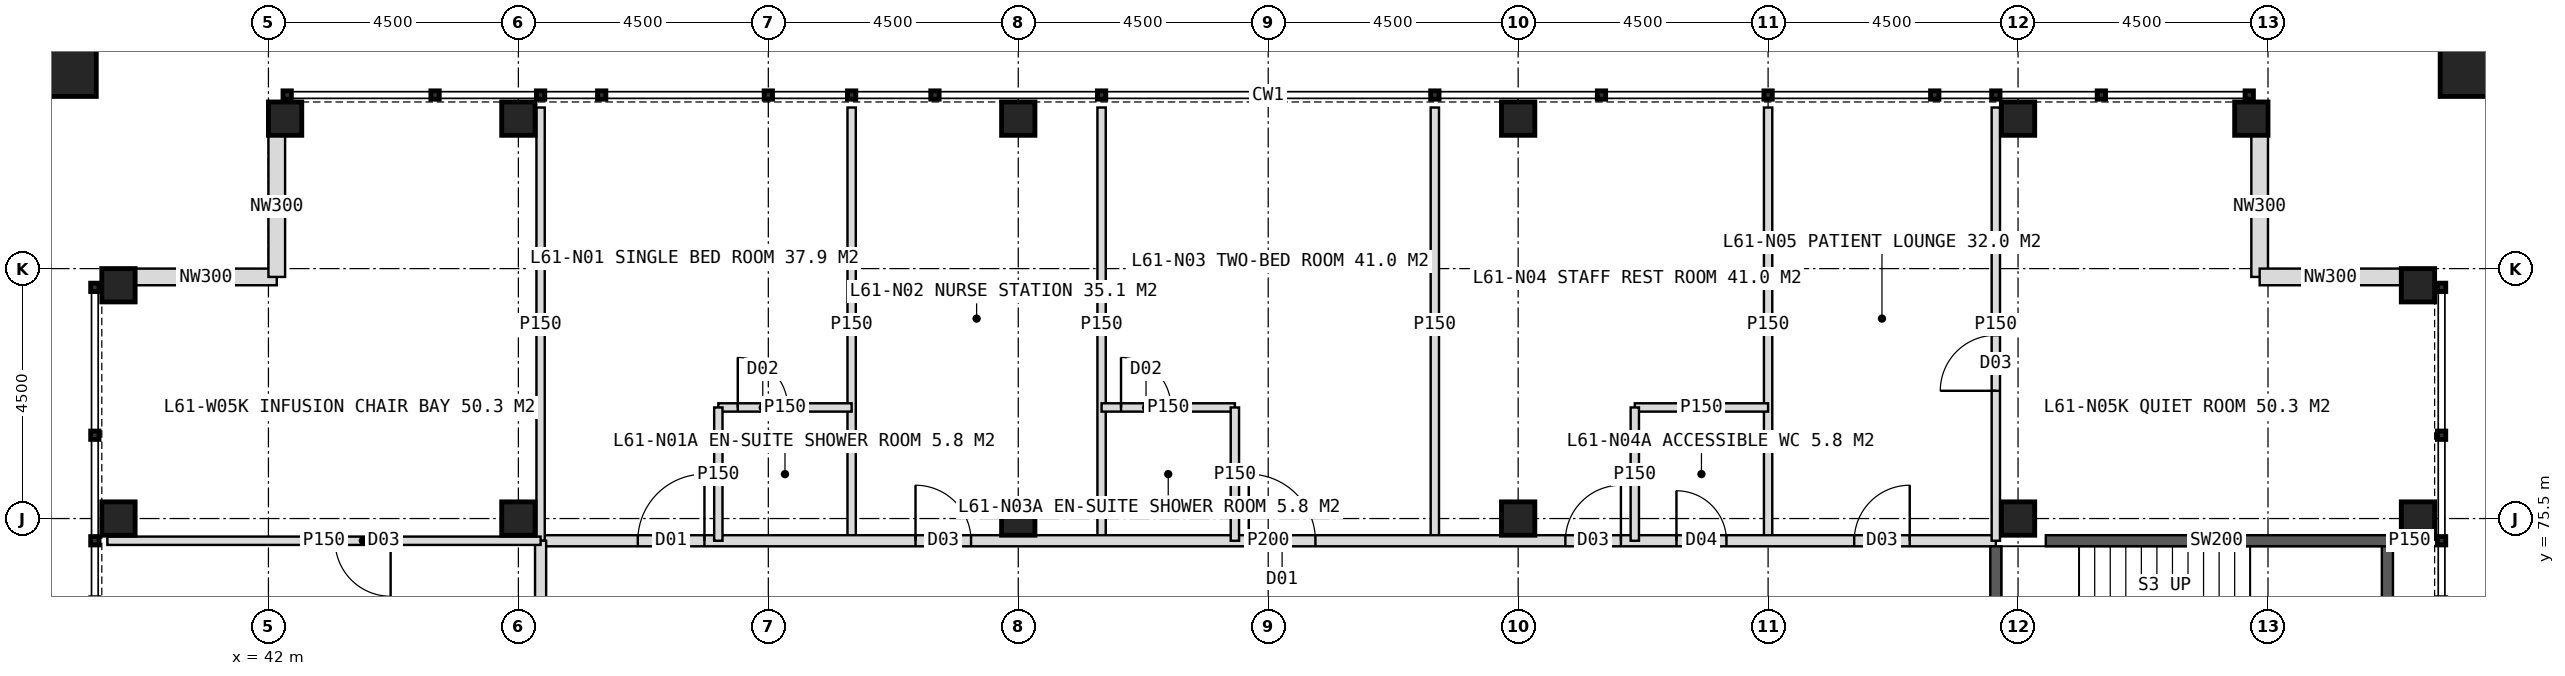
"""IFC4 building model, lengths in metres.
Left out: names, types, materials, properties, quantities, classifications, styles, units other than length and angle.
Written with IfcOpenShell. Run it as: python <this file> out.ifc"""

import sys

from ifc_helpers import new_model, si_unit, direction, frame, frame_2d, origin, origin_2d, place, context, subcontext, project, spatial, rectangle, hollow_rectangle, extrude, element, fill, save


model = new_model("IFC4")
c1 = context("Model", 3, precision=1e-05, world=origin(), true_north=direction((0.0, 1.0)))
c2 = subcontext(c1, "Body", "Model", "MODEL_VIEW")
j1 = project(units=[si_unit("LENGTHUNIT", "METRE"), si_unit("PLANEANGLEUNIT", "RADIAN")], contexts=[c1])
p1 = place(None, origin())
s1 = spatial("IfcSite", under=j1, at=p1, CompositionType="ELEMENT")
p2 = place(p1, origin())
s2 = spatial("IfcBuilding", under=s1, at=p2, CompositionType="ELEMENT")
p3 = place(p2, frame((0.0, 0.0, 254.0)))
s3 = spatial("IfcBuildingStorey", under=s2, at=p3, CompositionType="ELEMENT", Elevation=254.0)
for number, where, z_axis, x_axis in (
    (1, (73.5, 75.5, 0.0), (0.0, 0.0, 1.0), (1.0, 0.0, 0.0)),
    (2, (46.5, 75.5, 0.0), (0.0, 0.0, 1.0), (1.0, 0.0, 0.0)),
    (3, (55.5, 75.5, 0.0), (0.0, 0.0, 1.0), (1.0, 0.0, 0.0)),
    (4, (64.5, 75.5, 0.0), (0.0, 0.0, 1.0), (1.0, 0.0, 0.0)),
    (5, (42.3, 82.7, 0.0), (0.0, 0.0, 1.0), (1.0, 0.0, 0.0)),
    (6, (46.5, 82.7, 0.0), (0.0, 0.0, 1.0), (1.0, 0.0, 0.0)),
    (7, (55.5, 82.7, 0.0), (0.0, 0.0, 1.0), (1.0, 0.0, 0.0)),
    (8, (64.5, 82.7, 0.0), (0.0, 0.0, 1.0), (1.0, 0.0, 0.0)),
    (9, (73.5, 82.7, 0.0), (0.0, 0.0, 1.0), (1.0, 0.0, 0.0)),
    (10, (39.3, 75.5, 0.0), (0.0, 0.0, 1.0), (1.0, 0.0, 0.0)),
    (11, (80.7, 75.5, 0.0), (0.0, 0.0, 1.0), (1.0, 0.0, 0.0)),
    (12, (77.7, 82.7, 0.0), (0.0, 0.0, 1.0), (1.0, 0.0, 0.0)),
    (13, (39.3, 79.7, 0.0), (0.0, 0.0, 1.0), (1.0, 0.0, 0.0)),
    (14, (80.7, 79.7, 0.0), (0.0, 0.0, 1.0), (1.0, 0.0, 0.0)),
):
    element("IfcColumn", number, at=place(p3, frame(where, z_axis=z_axis, x_axis=x_axis)), inside=s3, PredefinedType="COLUMN", context=c2, shape_type="SweptSolid", body=[
        extrude(hollow_rectangle(XDim=0.6, YDim=0.6, WallThickness=0.04, at=origin_2d()), origin(), (0.0, 0.0, 1.0), 4.0),
    ])
for number, where, z_axis, x_axis in (
    (15, (81.6, 83.6, 0.0), (0.0, 0.0, 1.0), (1.0, 0.0, 0.0)),
    (16, (38.4, 83.6, 0.0), (0.0, 0.0, 1.0), (1.0, 0.0, 0.0)),
):
    element("IfcColumn", number, at=place(p3, frame(where, z_axis=z_axis, x_axis=x_axis)), inside=s3, PredefinedType="COLUMN", context=c2, shape_type="SweptSolid", body=[
        extrude(hollow_rectangle(XDim=1.0, YDim=1.0, WallThickness=0.06, at=origin_2d()), origin(), (0.0, 0.0, 1.0), 4.0),
    ])
for number, where, z_axis, x_axis in (
    (17, (77.85, 82.4, 0.0), (0.0, 0.0, 1.0), (0.0, -1.0, 0.0)),
    (18, (77.85, 79.85, 0.0), (0.0, 0.0, 1.0), (1.0, 0.0, 0.0)),
    (19, (39.6, 79.85, 0.0), (0.0, 0.0, 1.0), (1.0, 0.0, 0.0)),
    (20, (42.15, 79.85, 0.0), (0.0, 0.0, 1.0), (0.0, 1.0, 0.0)),
):
    element("IfcWall", number, at=place(p3, frame(where, z_axis=z_axis, x_axis=x_axis)), inside=s3, PredefinedType="ELEMENTEDWALL", context=c2, shape_type="SweptSolid", body=[
        extrude(rectangle(XDim=2.55, YDim=0.3, at=frame_2d((1.275, 0.0))), origin(), (0.0, 0.0, 1.0), 2.95),
    ])
for number, where, z_axis, x_axis in (
    (21, (52.5, 75.1, 0.0), (0.0, 0.0, 1.0), (0.0, 1.0, 0.0)),
    (22, (57.0, 75.1, 0.0), (0.0, 0.0, 1.0), (0.0, 1.0, 0.0)),
    (23, (63.0, 75.1, 0.0), (0.0, 0.0, 1.0), (0.0, 1.0, 0.0)),
    (24, (69.0, 75.1, 0.0), (0.0, 0.0, 1.0), (0.0, 1.0, 0.0)),
):
    element("IfcWall", number, at=place(p3, frame(where, z_axis=z_axis, x_axis=x_axis)), inside=s3, PredefinedType="PARTITIONING", context=c2, shape_type="SweptSolid", body=[
        extrude(rectangle(XDim=7.8, YDim=0.15, at=frame_2d((3.9, 0.0))), origin(), (0.0, 0.0, 1.0), 3.75),
    ])
p4 = place(p3, frame((46.9, 75.1, 0.0), z_axis=(0.0, 0.0, 1.0), x_axis=(1.0, 0.0, 0.0)))
e25 = element("IfcWall", 25, at=p4, inside=s3, PredefinedType="PARTITIONING", context=c2, shape_type="SweptSolid", body=[
    extrude(rectangle(XDim=26.2, YDim=0.2, at=frame_2d((13.1, 0.0))), origin(), (0.0, 0.0, 1.0), 3.75),
])
p5 = place(p4, frame((1.75, 0.0, 0.0)))
e26 = element("IfcOpeningElement", 26, at=p5, cuts=e25, PredefinedType="OPENING", context=c2, shape_type="SweptSolid", body=[
    extrude(rectangle(XDim=1.2, YDim=2.2, at=frame_2d((0.6, 1.1))), frame((0.0, 0.11, 0.0), z_axis=(0.0, -1.0, 0.0), x_axis=(1.0, 0.0, 0.0)), (0.0, 0.0, 1.0), 0.22),
])
p6 = place(p4, frame((6.75, 0.0, 0.0)))
e27 = element("IfcOpeningElement", 27, at=p6, cuts=e25, PredefinedType="OPENING", context=c2, shape_type="SweptSolid", body=[
    extrude(rectangle(XDim=1.0, YDim=2.1, at=frame_2d((0.5, 1.05))), frame((0.0, 0.11, 0.0), z_axis=(0.0, -1.0, 0.0), x_axis=(1.0, 0.0, 0.0)), (0.0, 0.0, 1.0), 0.22),
])
p7 = place(p4, frame((12.75, 0.0, 0.0)))
e28 = element("IfcOpeningElement", 28, at=p7, cuts=e25, PredefinedType="OPENING", context=c2, shape_type="SweptSolid", body=[
    extrude(rectangle(XDim=1.2, YDim=2.2, at=frame_2d((0.6, 1.1))), frame((0.0, 0.11, 0.0), z_axis=(0.0, -1.0, 0.0), x_axis=(1.0, 0.0, 0.0)), (0.0, 0.0, 1.0), 0.22),
])
p8 = place(p4, frame((20.45, 0.0, 0.0)))
e29 = element("IfcOpeningElement", 29, at=p8, cuts=e25, PredefinedType="OPENING", context=c2, shape_type="SweptSolid", body=[
    extrude(rectangle(XDim=0.9, YDim=2.1, at=frame_2d((0.45, 1.05))), frame((0.0, 0.11, 0.0), z_axis=(0.0, -1.0, 0.0), x_axis=(1.0, 0.0, 0.0)), (0.0, 0.0, 1.0), 0.22),
])
p9 = place(p4, frame((18.45, 0.0, 0.0)))
e30 = element("IfcOpeningElement", 30, at=p9, cuts=e25, PredefinedType="OPENING", context=c2, shape_type="SweptSolid", body=[
    extrude(rectangle(XDim=1.0, YDim=2.1, at=frame_2d((0.5, 1.05))), frame((0.0, 0.11, 0.0), z_axis=(0.0, -1.0, 0.0), x_axis=(1.0, 0.0, 0.0)), (0.0, 0.0, 1.0), 0.22),
])
p10 = place(p4, frame((23.65, 0.0, 0.0)))
e31 = element("IfcOpeningElement", 31, at=p10, cuts=e25, PredefinedType="OPENING", context=c2, shape_type="SweptSolid", body=[
    extrude(rectangle(XDim=1.0, YDim=2.1, at=frame_2d((0.5, 1.05))), frame((0.0, 0.11, 0.0), z_axis=(0.0, -1.0, 0.0), x_axis=(1.0, 0.0, 0.0)), (0.0, 0.0, 1.0), 0.22),
])
p11 = place(p3, frame((46.9, 75.1, 0.0), z_axis=(0.0, 0.0, 1.0), x_axis=(0.0, 1.0, 0.0)))
e32 = element("IfcWall", 32, at=p11, inside=s3, PredefinedType="PARTITIONING", context=c2, shape_type="SweptSolid", body=[
    extrude(rectangle(XDim=7.8, YDim=0.15, at=frame_2d((3.9, 0.0))), origin(), (0.0, 0.0, 1.0), 3.75),
])
p12 = place(p3, frame((50.1, 77.5, 0.0), z_axis=(0.0, 0.0, 1.0), x_axis=(1.0, 0.0, 0.0)))
e33 = element("IfcWall", 33, at=p12, inside=s3, PredefinedType="PARTITIONING", context=c2, shape_type="SweptSolid", body=[
    extrude(rectangle(XDim=2.4, YDim=0.15, at=frame_2d((1.2, 0.0))), origin(), (0.0, 0.0, 1.0), 3.75),
])
p13 = place(p12, frame((0.35, 0.0, 0.0)))
e34 = element("IfcOpeningElement", 34, at=p13, cuts=e33, PredefinedType="OPENING", context=c2, shape_type="SweptSolid", body=[
    extrude(rectangle(XDim=0.9, YDim=2.1, at=frame_2d((0.45, 1.05))), frame((0.0, 0.085, 0.0), z_axis=(0.0, -1.0, 0.0), x_axis=(1.0, 0.0, 0.0)), (0.0, 0.0, 1.0), 0.17),
])
p14 = place(p3, frame((50.1, 75.1, 0.0), z_axis=(0.0, 0.0, 1.0), x_axis=(0.0, 1.0, 0.0)))
e35 = element("IfcWall", 35, at=p14, inside=s3, PredefinedType="PARTITIONING", context=c2, shape_type="SweptSolid", body=[
    extrude(rectangle(XDim=2.4, YDim=0.15, at=frame_2d((1.2, 0.0))), origin(), (0.0, 0.0, 1.0), 3.75),
])
p15 = place(p3, frame((57.0, 77.5, 0.0), z_axis=(0.0, 0.0, 1.0), x_axis=(1.0, 0.0, 0.0)))
e36 = element("IfcWall", 36, at=p15, inside=s3, PredefinedType="PARTITIONING", context=c2, shape_type="SweptSolid", body=[
    extrude(rectangle(XDim=2.4, YDim=0.15, at=frame_2d((1.2, 0.0))), origin(), (0.0, 0.0, 1.0), 3.75),
])
p16 = place(p15, frame((0.35, 0.0, 0.0)))
e37 = element("IfcOpeningElement", 37, at=p16, cuts=e36, PredefinedType="OPENING", context=c2, shape_type="SweptSolid", body=[
    extrude(rectangle(XDim=0.9, YDim=2.1, at=frame_2d((0.45, 1.05))), frame((0.0, 0.085, 0.0), z_axis=(0.0, -1.0, 0.0), x_axis=(1.0, 0.0, 0.0)), (0.0, 0.0, 1.0), 0.17),
])
for number, where, z_axis, x_axis in (
    (38, (59.4, 75.1, 0.0), (0.0, 0.0, 1.0), (0.0, 1.0, 0.0)),
    (39, (66.6, 77.5, 0.0), (0.0, 0.0, 1.0), (1.0, 0.0, 0.0)),
    (40, (66.6, 75.1, 0.0), (0.0, 0.0, 1.0), (0.0, 1.0, 0.0)),
):
    element("IfcWall", number, at=place(p3, frame(where, z_axis=z_axis, x_axis=x_axis)), inside=s3, PredefinedType="PARTITIONING", context=c2, shape_type="SweptSolid", body=[
        extrude(rectangle(XDim=2.4, YDim=0.15, at=frame_2d((1.2, 0.0))), origin(), (0.0, 0.0, 1.0), 3.75),
    ])
p17 = place(p3, frame((73.1, 75.1, 0.0), z_axis=(0.0, 0.0, 1.0), x_axis=(0.0, 1.0, 0.0)))
e41 = element("IfcWall", 41, at=p17, inside=s3, PredefinedType="PARTITIONING", context=c2, shape_type="SweptSolid", body=[
    extrude(rectangle(XDim=7.8, YDim=0.15, at=frame_2d((3.9, 0.0))), origin(), (0.0, 0.0, 1.0), 3.75),
])
p18 = place(p17, frame((2.7, 0.0, 0.0)))
e42 = element("IfcOpeningElement", 42, at=p18, cuts=e41, PredefinedType="OPENING", context=c2, shape_type="SweptSolid", body=[
    extrude(rectangle(XDim=1.0, YDim=2.1, at=frame_2d((0.5, 1.05))), frame((0.0, 0.085, 0.0), z_axis=(0.0, -1.0, 0.0), x_axis=(1.0, 0.0, 0.0)), (0.0, 0.0, 1.0), 0.17),
])
p19 = place(p3, frame((46.9, 48.9, 0.0), z_axis=(0.0, 0.0, 1.0), x_axis=(0.0, 1.0, 0.0)))
e43 = element("IfcWall", 43, at=p19, inside=s3, PredefinedType="PARTITIONING", context=c2, shape_type="SweptSolid", body=[
    extrude(rectangle(XDim=26.2, YDim=0.2, at=frame_2d((13.1, 0.0))), origin(), (0.0, 0.0, 1.0), 3.75),
])
p20 = place(p19, frame((1.75, 0.0, 0.0)))
e44 = element("IfcOpeningElement", 44, at=p20, cuts=e43, PredefinedType="OPENING", context=c2, shape_type="SweptSolid", body=[
    extrude(rectangle(XDim=1.2, YDim=2.2, at=frame_2d((0.6, 1.1))), frame((0.0, 0.11, 0.0), z_axis=(0.0, -1.0, 0.0), x_axis=(1.0, 0.0, 0.0)), (0.0, 0.0, 1.0), 0.22),
])
p21 = place(p19, frame((6.75, 0.0, 0.0)))
e45 = element("IfcOpeningElement", 45, at=p21, cuts=e43, PredefinedType="OPENING", context=c2, shape_type="SweptSolid", body=[
    extrude(rectangle(XDim=1.0, YDim=2.1, at=frame_2d((0.5, 1.05))), frame((0.0, 0.11, 0.0), z_axis=(0.0, -1.0, 0.0), x_axis=(1.0, 0.0, 0.0)), (0.0, 0.0, 1.0), 0.22),
])
p22 = place(p19, frame((11.1, 0.0, 0.0)))
e46 = element("IfcOpeningElement", 46, at=p22, cuts=e43, PredefinedType="OPENING", context=c2, shape_type="SweptSolid", body=[
    extrude(rectangle(XDim=1.0, YDim=2.1, at=frame_2d((0.5, 1.05))), frame((0.0, 0.11, 0.0), z_axis=(0.0, -1.0, 0.0), x_axis=(1.0, 0.0, 0.0)), (0.0, 0.0, 1.0), 0.22),
])
p23 = place(p19, frame((18.45, 0.0, 0.0)))
e47 = element("IfcOpeningElement", 47, at=p23, cuts=e43, PredefinedType="OPENING", context=c2, shape_type="SweptSolid", body=[
    extrude(rectangle(XDim=1.2, YDim=2.2, at=frame_2d((0.6, 1.1))), frame((0.0, 0.11, 0.0), z_axis=(0.0, -1.0, 0.0), x_axis=(1.0, 0.0, 0.0)), (0.0, 0.0, 1.0), 0.22),
])
p24 = place(p19, frame((23.25, 0.0, 0.0)))
e48 = element("IfcOpeningElement", 48, at=p24, cuts=e43, PredefinedType="OPENING", context=c2, shape_type="SweptSolid", body=[
    extrude(rectangle(XDim=1.2, YDim=2.2, at=frame_2d((0.6, 1.1))), frame((0.0, 0.11, 0.0), z_axis=(0.0, -1.0, 0.0), x_axis=(1.0, 0.0, 0.0)), (0.0, 0.0, 1.0), 0.22),
])
p25 = place(p3, frame((46.9, 75.1, 0.0), z_axis=(0.0, 0.0, 1.0), x_axis=(-1.0, 0.0, 0.0)))
e49 = element("IfcWall", 49, at=p25, inside=s3, PredefinedType="PARTITIONING", context=c2, shape_type="SweptSolid", body=[
    extrude(rectangle(XDim=7.8, YDim=0.15, at=frame_2d((3.9, 0.0))), origin(), (0.0, 0.0, 1.0), 3.75),
])
p26 = place(p25, frame((2.7, 0.0, 0.0)))
e50 = element("IfcOpeningElement", 50, at=p26, cuts=e49, PredefinedType="OPENING", context=c2, shape_type="SweptSolid", body=[
    extrude(rectangle(XDim=1.0, YDim=2.1, at=frame_2d((0.5, 1.05))), frame((0.0, 0.085, 0.0), z_axis=(0.0, -1.0, 0.0), x_axis=(1.0, 0.0, 0.0)), (0.0, 0.0, 1.0), 0.17),
])
p27 = place(p3, frame((80.2, 75.1, 0.0), z_axis=(0.0, 0.0, 1.0), x_axis=(1.0, 0.0, 0.0)))
e51 = element("IfcWall", 51, at=p27, inside=s3, PredefinedType="PARTITIONING", context=c2, shape_type="SweptSolid", body=[
    extrude(rectangle(XDim=0.7, YDim=0.15, at=frame_2d((0.35, 0.0))), origin(), (0.0, 0.0, 1.0), 3.75),
])
p28 = place(p3, frame((73.1, 75.0, 0.0), z_axis=(0.0, 0.0, 1.0), x_axis=(0.0, -1.0, 0.0)))
e52 = element("IfcWall", 52, at=p28, inside=s3, PredefinedType="SOLIDWALL", context=c2, shape_type="SweptSolid", body=[
    extrude(rectangle(XDim=4.0, YDim=0.2, at=frame_2d((2.0, 0.0))), origin(), (0.0, 0.0, 1.0), 3.75),
])
p29 = place(p28, frame((1.5, 0.0, 0.0)))
e53 = element("IfcOpeningElement", 53, at=p29, cuts=e52, PredefinedType="OPENING", context=c2, shape_type="SweptSolid", body=[
    extrude(rectangle(XDim=1.2, YDim=2.1, at=frame_2d((0.6, 1.05))), frame((0.0, 0.11, 0.0), z_axis=(0.0, -1.0, 0.0), x_axis=(1.0, 0.0, 0.0)), (0.0, 0.0, 1.0), 0.22),
])
p30 = place(p3, frame((80.15, 71.0, 0.0), z_axis=(0.0, 0.0, 1.0), x_axis=(0.0, 1.0, 0.0)))
e54 = element("IfcWall", 54, at=p30, inside=s3, PredefinedType="SOLIDWALL", context=c2, shape_type="SweptSolid", body=[
    extrude(rectangle(XDim=4.1, YDim=0.2, at=frame_2d((2.05, 0.0))), origin(), (0.0, 0.0, 1.0), 3.75),
])
p31 = place(p3, frame((74.0, 75.1, 0.0), z_axis=(0.0, 0.0, 1.0), x_axis=(1.0, 0.0, 0.0)))
e55 = element("IfcWall", 55, at=p31, inside=s3, PredefinedType="SOLIDWALL", context=c2, shape_type="SweptSolid", body=[
    extrude(rectangle(XDim=6.15, YDim=0.2, at=frame_2d((3.075, 0.0))), origin(), (0.0, 0.0, 1.0), 3.75),
])
p32 = place(p5, origin())
e56 = element("IfcDoor", 56, at=p32, inside=s3, OperationType="SINGLE_SWING_RIGHT", PredefinedType="DOOR", context=c2, shape_type="SweptSolid", body=[
    extrude(rectangle(XDim=1.2, YDim=2.2, at=frame_2d((0.6, 1.1))), frame((0.0, 0.025, 0.0), z_axis=(0.0, -1.0, 0.0), x_axis=(1.0, 0.0, 0.0)), (0.0, 0.0, 1.0), 0.05),
])
fill(e26, e56)
p33 = place(p13, origin())
e57 = element("IfcDoor", 57, at=p33, inside=s3, OperationType="SINGLE_SWING_LEFT", PredefinedType="DOOR", context=c2, shape_type="SweptSolid", body=[
    extrude(rectangle(XDim=0.9, YDim=2.1, at=frame_2d((0.45, 1.05))), frame((0.0, 0.025, 0.0), z_axis=(0.0, -1.0, 0.0), x_axis=(1.0, 0.0, 0.0)), (0.0, 0.0, 1.0), 0.05),
])
fill(e34, e57)
p34 = place(p6, origin())
e58 = element("IfcDoor", 58, at=p34, inside=s3, OperationType="SINGLE_SWING_LEFT", PredefinedType="DOOR", context=c2, shape_type="SweptSolid", body=[
    extrude(rectangle(XDim=1.0, YDim=2.1, at=frame_2d((0.5, 1.05))), frame((0.0, 0.025, 0.0), z_axis=(0.0, -1.0, 0.0), x_axis=(1.0, 0.0, 0.0)), (0.0, 0.0, 1.0), 0.05),
])
fill(e27, e58)
p35 = place(p7, origin())
e59 = element("IfcDoor", 59, at=p35, inside=s3, OperationType="SINGLE_SWING_LEFT", PredefinedType="DOOR", context=c2, shape_type="SweptSolid", body=[
    extrude(rectangle(XDim=1.2, YDim=2.2, at=frame_2d((0.6, 1.1))), frame((0.0, 0.025, 0.0), z_axis=(0.0, -1.0, 0.0), x_axis=(1.0, 0.0, 0.0)), (0.0, 0.0, 1.0), 0.05),
])
fill(e28, e59)
p36 = place(p16, origin())
e60 = element("IfcDoor", 60, at=p36, inside=s3, OperationType="SINGLE_SWING_LEFT", PredefinedType="DOOR", context=c2, shape_type="SweptSolid", body=[
    extrude(rectangle(XDim=0.9, YDim=2.1, at=frame_2d((0.45, 1.05))), frame((0.0, 0.025, 0.0), z_axis=(0.0, -1.0, 0.0), x_axis=(1.0, 0.0, 0.0)), (0.0, 0.0, 1.0), 0.05),
])
fill(e37, e60)
p37 = place(p8, origin())
e61 = element("IfcDoor", 61, at=p37, inside=s3, OperationType="SINGLE_SWING_LEFT", PredefinedType="DOOR", context=c2, shape_type="SweptSolid", body=[
    extrude(rectangle(XDim=0.9, YDim=2.1, at=frame_2d((0.45, 1.05))), frame((0.0, 0.025, 0.0), z_axis=(0.0, -1.0, 0.0), x_axis=(1.0, 0.0, 0.0)), (0.0, 0.0, 1.0), 0.05),
])
fill(e29, e61)
p38 = place(p9, origin())
e62 = element("IfcDoor", 62, at=p38, inside=s3, OperationType="SINGLE_SWING_RIGHT", PredefinedType="DOOR", context=c2, shape_type="SweptSolid", body=[
    extrude(rectangle(XDim=1.0, YDim=2.1, at=frame_2d((0.5, 1.05))), frame((0.0, 0.025, 0.0), z_axis=(0.0, -1.0, 0.0), x_axis=(1.0, 0.0, 0.0)), (0.0, 0.0, 1.0), 0.05),
])
fill(e30, e62)
p39 = place(p18, origin())
e63 = element("IfcDoor", 63, at=p39, inside=s3, OperationType="SINGLE_SWING_LEFT", PredefinedType="DOOR", context=c2, shape_type="SweptSolid", body=[
    extrude(rectangle(XDim=1.0, YDim=2.1, at=frame_2d((0.5, 1.05))), frame((0.0, 0.025, 0.0), z_axis=(0.0, -1.0, 0.0), x_axis=(1.0, 0.0, 0.0)), (0.0, 0.0, 1.0), 0.05),
])
fill(e42, e63)
p40 = place(p10, origin())
e64 = element("IfcDoor", 64, at=p40, inside=s3, OperationType="SINGLE_SWING_RIGHT", PredefinedType="DOOR", context=c2, shape_type="SweptSolid", body=[
    extrude(rectangle(XDim=1.0, YDim=2.1, at=frame_2d((0.5, 1.05))), frame((0.0, 0.025, 0.0), z_axis=(0.0, -1.0, 0.0), x_axis=(1.0, 0.0, 0.0)), (0.0, 0.0, 1.0), 0.05),
])
fill(e31, e64)
p41 = place(p26, origin())
e65 = element("IfcDoor", 65, at=p41, inside=s3, OperationType="SINGLE_SWING_LEFT", PredefinedType="DOOR", context=c2, shape_type="SweptSolid", body=[
    extrude(rectangle(XDim=1.0, YDim=2.1, at=frame_2d((0.5, 1.05))), frame((0.0, 0.025, 0.0), z_axis=(0.0, -1.0, 0.0), x_axis=(1.0, 0.0, 0.0)), (0.0, 0.0, 1.0), 0.05),
])
fill(e50, e65)
save(model, sys.argv[1])
